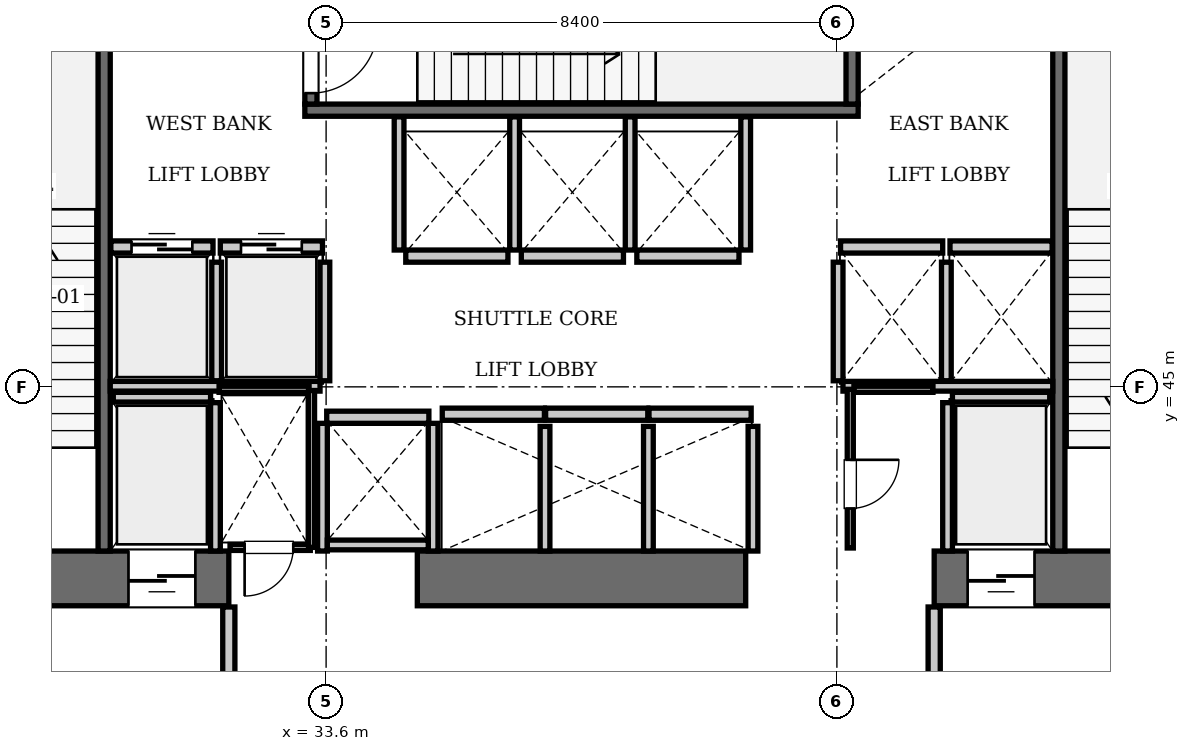
"""IFC4 building model, lengths in metres.
Left out: names, types, materials, properties, quantities, classifications, styles, units other than length and angle.
Written with IfcOpenShell. Run it as: python <this file> out.ifc"""

import sys

from ifc_helpers import new_model, si_unit, direction, frame, frame_2d, origin, place, context, subcontext, project, spatial, rectangle, extrude, element, fill, save


model = new_model("IFC4")
c1 = context("Model", 3, precision=1e-05, world=origin(), true_north=direction((0.0, 1.0)))
c2 = subcontext(c1, "Body", "Model", "MODEL_VIEW")
j1 = project(units=[si_unit("LENGTHUNIT", "METRE"), si_unit("PLANEANGLEUNIT", "RADIAN")], contexts=[c1])
p1 = place(None, origin())
s1 = spatial("IfcSite", under=j1, at=p1, CompositionType="ELEMENT")
p2 = place(p1, origin())
s2 = spatial("IfcBuilding", under=s1, at=p2, CompositionType="ELEMENT")
p3 = place(p2, frame((0.0, 0.0, 5.6)))
s3 = spatial("IfcBuildingStorey", under=s2, at=p3, CompositionType="ELEMENT", Elevation=5.6)
p4 = place(p3, frame((25.2, 41.85, 0.0), z_axis=(0.0, 0.0, 1.0), x_axis=(1.0, 0.0, 0.0)))
e1 = element("IfcWall", 1, at=p4, inside=s3, PredefinedType="SHEAR", context=c2, shape_type="SweptSolid", body=[
    extrude(rectangle(XDim=6.8, YDim=0.9, at=frame_2d((3.4, 0.0))), origin(), (0.0, 0.0, 1.0), 5.25),
])
p5 = place(p4, frame((1.65, 0.0, 0.0)))
e2 = element("IfcOpeningElement", 2, at=p5, cuts=e1, PredefinedType="OPENING", context=c2, shape_type="SweptSolid", body=[
    extrude(rectangle(XDim=1.15, YDim=2.15, at=frame_2d((0.575, 1.075))), frame((0.0, 0.46, 0.0), z_axis=(0.0, -1.0, 0.0), x_axis=(1.0, 0.0, 0.0)), (0.0, 0.0, 1.0), 0.92),
])
p6 = place(p4, frame((5.15, 0.0, 0.0)))
e3 = element("IfcOpeningElement", 3, at=p6, cuts=e1, PredefinedType="OPENING", context=c2, shape_type="SweptSolid", body=[
    extrude(rectangle(XDim=1.1, YDim=2.2, at=frame_2d((0.55, 1.1))), frame((0.0, 0.46, 0.0), z_axis=(0.0, -1.0, 0.0), x_axis=(1.0, 0.0, 0.0)), (0.0, 0.0, 1.0), 0.92),
])
p7 = place(p3, frame((35.1, 41.85, 0.0), z_axis=(0.0, 0.0, 1.0), x_axis=(1.0, 0.0, 0.0)))
e4 = element("IfcWall", 4, at=p7, inside=s3, PredefinedType="SHEAR", context=c2, shape_type="SweptSolid", body=[
    extrude(rectangle(XDim=5.4, YDim=0.9, at=frame_2d((2.7, 0.0))), origin(), (0.0, 0.0, 1.0), 5.25),
])
p8 = place(p3, frame((43.6, 41.85, 0.0), z_axis=(0.0, 0.0, 1.0), x_axis=(1.0, 0.0, 0.0)))
e5 = element("IfcWall", 5, at=p8, inside=s3, PredefinedType="SHEAR", context=c2, shape_type="SweptSolid", body=[
    extrude(rectangle(XDim=6.8, YDim=0.9, at=frame_2d((3.4, 0.0))), origin(), (0.0, 0.0, 1.0), 5.25),
])
p9 = place(p8, frame((3.9, 0.0, 0.0)))
e6 = element("IfcOpeningElement", 6, at=p9, cuts=e5, PredefinedType="OPENING", context=c2, shape_type="SweptSolid", body=[
    extrude(rectangle(XDim=1.15, YDim=2.15, at=frame_2d((0.575, 1.075))), frame((0.0, 0.46, 0.0), z_axis=(0.0, -1.0, 0.0), x_axis=(1.0, 0.0, 0.0)), (0.0, 0.0, 1.0), 0.92),
])
p10 = place(p8, frame((0.55, 0.0, 0.0)))
e7 = element("IfcOpeningElement", 7, at=p10, cuts=e5, PredefinedType="OPENING", context=c2, shape_type="SweptSolid", body=[
    extrude(rectangle(XDim=1.1, YDim=2.2, at=frame_2d((0.55, 1.1))), frame((0.0, 0.46, 0.0), z_axis=(0.0, -1.0, 0.0), x_axis=(1.0, 0.0, 0.0)), (0.0, 0.0, 1.0), 0.92),
])
p11 = place(p3, frame((29.95, 42.3, 0.0), z_axis=(0.0, 0.0, 1.0), x_axis=(0.0, 1.0, 0.0)))
e8 = element("IfcWall", 8, at=p11, inside=s3, PredefinedType="SOLIDWALL", context=c2, shape_type="SweptSolid", body=[
    extrude(rectangle(XDim=8.85, YDim=0.2, at=frame_2d((4.425, 0.0))), origin(), (0.0, 0.0, 1.0), 4.97),
])
p12 = place(p3, frame((33.25, 49.55, 0.0), z_axis=(0.0, 0.0, 1.0), x_axis=(1.0, 0.0, 0.0)))
e9 = element("IfcWall", 9, at=p12, inside=s3, PredefinedType="SOLIDWALL", context=c2, shape_type="SweptSolid", body=[
    extrude(rectangle(XDim=9.1, YDim=0.2, at=frame_2d((4.55, 0.0))), origin(), (0.0, 0.0, 1.0), 4.97),
])
p13 = place(p3, frame((42.25, 49.65, 0.0), z_axis=(0.0, 0.0, 1.0), x_axis=(0.0, 1.0, 0.0)))
e10 = element("IfcWall", 10, at=p13, inside=s3, PredefinedType="SOLIDWALL", context=c2, shape_type="SweptSolid", body=[
    extrude(rectangle(XDim=3.45, YDim=0.2, at=frame_2d((1.725, 0.0))), origin(), (0.0, 0.0, 1.0), 4.97),
])
p14 = place(p3, frame((33.35, 49.65, 0.0), z_axis=(0.0, 0.0, 1.0), x_axis=(0.0, 1.0, 0.0)))
e11 = element("IfcWall", 11, at=p14, inside=s3, PredefinedType="SOLIDWALL", context=c2, shape_type="SweptSolid", body=[
    extrude(rectangle(XDim=3.45, YDim=0.2, at=frame_2d((1.725, 0.0))), origin(), (0.0, 0.0, 1.0), 4.97),
])
p15 = place(p14, frame((0.18, 0.0, 0.0)))
e12 = element("IfcOpeningElement", 12, at=p15, cuts=e11, PredefinedType="OPENING", context=c2, shape_type="SweptSolid", body=[
    extrude(rectangle(XDim=1.1, YDim=2.15, at=frame_2d((0.55, 1.075))), frame((0.0, 0.11, 0.0), z_axis=(0.0, -1.0, 0.0), x_axis=(1.0, 0.0, 0.0)), (0.0, 0.0, 1.0), 0.22),
])
p16 = place(p3, frame((45.65, 42.3, 0.0), z_axis=(0.0, 0.0, 1.0), x_axis=(0.0, 1.0, 0.0)))
e13 = element("IfcWall", 13, at=p16, inside=s3, PredefinedType="SOLIDWALL", context=c2, shape_type="SweptSolid", body=[
    extrude(rectangle(XDim=8.85, YDim=0.2, at=frame_2d((4.425, 0.0))), origin(), (0.0, 0.0, 1.0), 4.97),
])
p17 = place(p3, frame((30.06, 47.3, 0.0), z_axis=(0.0, 0.0, 1.0), x_axis=(1.0, 0.0, 0.0)))
e14 = element("IfcWall", 14, at=p17, inside=s3, PredefinedType="SOLIDWALL", context=c2, shape_type="SweptSolid", body=[
    extrude(rectangle(XDim=1.68, YDim=0.2, at=frame_2d((0.84, 0.0))), origin(), (0.0, 0.0, 1.0), 4.97),
])
p18 = place(p17, frame((0.34, 0.0, 0.0)))
e15 = element("IfcOpeningElement", 15, at=p18, cuts=e14, PredefinedType="OPENING", context=c2, shape_type="SweptSolid", body=[
    extrude(rectangle(XDim=1.0, YDim=2.15, at=frame_2d((0.5, 1.075))), frame((0.0, 0.11, 0.0), z_axis=(0.0, -1.0, 0.0), x_axis=(1.0, 0.0, 0.0)), (0.0, 0.0, 1.0), 0.22),
])
p19 = place(p3, frame((31.86, 47.3, 0.0), z_axis=(0.0, 0.0, 1.0), x_axis=(1.0, 0.0, 0.0)))
e16 = element("IfcWall", 16, at=p19, inside=s3, PredefinedType="SOLIDWALL", context=c2, shape_type="SweptSolid", body=[
    extrude(rectangle(XDim=1.68, YDim=0.2, at=frame_2d((0.84, 0.0))), origin(), (0.0, 0.0, 1.0), 4.97),
])
p20 = place(p19, frame((0.34, 0.0, 0.0)))
e17 = element("IfcOpeningElement", 17, at=p20, cuts=e16, PredefinedType="OPENING", context=c2, shape_type="SweptSolid", body=[
    extrude(rectangle(XDim=1.0, YDim=2.15, at=frame_2d((0.5, 1.075))), frame((0.0, 0.11, 0.0), z_axis=(0.0, -1.0, 0.0), x_axis=(1.0, 0.0, 0.0)), (0.0, 0.0, 1.0), 0.22),
])
for number, where, z_axis, x_axis in (
    (18, (42.06, 47.3, 0.0), (0.0, 0.0, 1.0), (1.0, 0.0, 0.0)),
    (19, (43.86, 47.3, 0.0), (0.0, 0.0, 1.0), (1.0, 0.0, 0.0)),
    (20, (35.51, 44.55, 0.0), (0.0, 0.0, 1.0), (1.0, 0.0, 0.0)),
    (21, (37.21, 44.55, 0.0), (0.0, 0.0, 1.0), (1.0, 0.0, 0.0)),
):
    element("IfcWall", number, at=place(p3, frame(where, z_axis=z_axis, x_axis=x_axis)), inside=s3, PredefinedType="SOLIDWALL", context=c2, shape_type="SweptSolid", body=[
        extrude(rectangle(XDim=1.68, YDim=0.2, at=frame_2d((0.84, 0.0))), origin(), (0.0, 0.0, 1.0), 4.97),
    ])
for number, where, z_axis, x_axis in (
    (22, (38.91, 44.55, 0.0), (0.0, 0.0, 1.0), (1.0, 0.0, 0.0)),
    (23, (34.91, 47.15, 0.0), (0.0, 0.0, 1.0), (1.0, 0.0, 0.0)),
):
    element("IfcWall", number, at=place(p3, frame(where, z_axis=z_axis, x_axis=x_axis)), inside=s3, PredefinedType="SOLIDWALL", context=c2, shape_type="SweptSolid", body=[
        extrude(rectangle(XDim=1.68, YDim=0.2, at=frame_2d((0.84, 0.0))), origin(), (0.0, 0.0, 1.0), 4.97),
    ])
for number, where, z_axis, x_axis in (
    (24, (36.81, 47.15, 0.0), (0.0, 0.0, 1.0), (1.0, 0.0, 0.0)),
    (25, (38.71, 47.15, 0.0), (0.0, 0.0, 1.0), (1.0, 0.0, 0.0)),
    (26, (33.61, 44.5, 0.0), (0.0, 0.0, 1.0), (1.0, 0.0, 0.0)),
):
    element("IfcWall", number, at=place(p3, frame(where, z_axis=z_axis, x_axis=x_axis)), inside=s3, PredefinedType="SOLIDWALL", context=c2, shape_type="SweptSolid", body=[
        extrude(rectangle(XDim=1.68, YDim=0.2, at=frame_2d((0.84, 0.0))), origin(), (0.0, 0.0, 1.0), 4.97),
    ])
p21 = place(p3, frame((30.1, 44.83, 0.0), z_axis=(0.0, 0.0, 1.0), x_axis=(1.0, 0.0, 0.0)))
e27 = element("IfcWall", 27, at=p21, inside=s3, PredefinedType="SOLIDWALL", context=c2, shape_type="SweptSolid", body=[
    extrude(rectangle(XDim=1.6, YDim=0.16, at=frame_2d((0.8, 0.0))), origin(), (0.0, 0.0, 1.0), 4.97),
])
p22 = place(p3, frame((31.78, 42.3, 0.0), z_axis=(0.0, 0.0, 1.0), x_axis=(0.0, 1.0, 0.0)))
e28 = element("IfcWall", 28, at=p22, inside=s3, PredefinedType="SOLIDWALL", context=c2, shape_type="SweptSolid", body=[
    extrude(rectangle(XDim=2.44, YDim=0.16, at=frame_2d((1.22, 0.0))), origin(), (0.0, 0.0, 1.0), 4.97),
])
p23 = place(p3, frame((43.9, 44.83, 0.0), z_axis=(0.0, 0.0, 1.0), x_axis=(1.0, 0.0, 0.0)))
e29 = element("IfcWall", 29, at=p23, inside=s3, PredefinedType="SOLIDWALL", context=c2, shape_type="SweptSolid", body=[
    extrude(rectangle(XDim=1.6, YDim=0.16, at=frame_2d((0.8, 0.0))), origin(), (0.0, 0.0, 1.0), 4.97),
])
p24 = place(p3, frame((43.82, 42.3, 0.0), z_axis=(0.0, 0.0, 1.0), x_axis=(0.0, 1.0, 0.0)))
e30 = element("IfcWall", 30, at=p24, inside=s3, PredefinedType="SOLIDWALL", context=c2, shape_type="SweptSolid", body=[
    extrude(rectangle(XDim=2.44, YDim=0.16, at=frame_2d((1.22, 0.0))), origin(), (0.0, 0.0, 1.0), 4.97),
])
for number, where, z_axis, x_axis in (
    (31, (31.8, 45.1, 0.0), (0.0, 0.0, 1.0), (0.0, 1.0, 0.0)),
    (32, (33.58, 45.1, 0.0), (0.0, 0.0, 1.0), (0.0, 1.0, 0.0)),
):
    element("IfcWall", number, at=place(p3, frame(where, z_axis=z_axis, x_axis=x_axis)), inside=s3, PredefinedType="SOLIDWALL", context=c2, shape_type="SweptSolid", body=[
        extrude(rectangle(XDim=1.95, YDim=0.16, at=frame_2d((0.975, 0.0))), origin(), (0.0, 0.0, 1.0), 4.97),
    ])
p25 = place(p3, frame((30.05, 45.01, 0.0), z_axis=(0.0, 0.0, 1.0), x_axis=(1.0, 0.0, 0.0)))
e33 = element("IfcWall", 33, at=p25, inside=s3, PredefinedType="SOLIDWALL", context=c2, shape_type="SweptSolid", body=[
    extrude(rectangle(XDim=3.45, YDim=0.16, at=frame_2d((1.725, 0.0))), origin(), (0.0, 0.0, 1.0), 4.97),
])
for number, where, z_axis, x_axis in (
    (34, (42.02, 45.1, 0.0), (0.0, 0.0, 1.0), (0.0, 1.0, 0.0)),
    (35, (43.8, 45.1, 0.0), (0.0, 0.0, 1.0), (0.0, 1.0, 0.0)),
):
    element("IfcWall", number, at=place(p3, frame(where, z_axis=z_axis, x_axis=x_axis)), inside=s3, PredefinedType="SOLIDWALL", context=c2, shape_type="SweptSolid", body=[
        extrude(rectangle(XDim=1.95, YDim=0.16, at=frame_2d((0.975, 0.0))), origin(), (0.0, 0.0, 1.0), 4.97),
    ])
p26 = place(p3, frame((42.1, 45.01, 0.0), z_axis=(0.0, 0.0, 1.0), x_axis=(1.0, 0.0, 0.0)))
e36 = element("IfcWall", 36, at=p26, inside=s3, PredefinedType="SOLIDWALL", context=c2, shape_type="SweptSolid", body=[
    extrude(rectangle(XDim=3.45, YDim=0.16, at=frame_2d((1.725, 0.0))), origin(), (0.0, 0.0, 1.0), 4.97),
])
for number, where, z_axis, x_axis in (
    (37, (37.2, 42.3, 0.0), (0.0, 0.0, 1.0), (0.0, 1.0, 0.0)),
    (38, (38.9, 42.3, 0.0), (0.0, 0.0, 1.0), (0.0, 1.0, 0.0)),
    (39, (40.62, 42.3, 0.0), (0.0, 0.0, 1.0), (0.0, 1.0, 0.0)),
):
    element("IfcWall", number, at=place(p3, frame(where, z_axis=z_axis, x_axis=x_axis)), inside=s3, PredefinedType="SOLIDWALL", context=c2, shape_type="SweptSolid", body=[
        extrude(rectangle(XDim=2.05, YDim=0.16, at=frame_2d((1.025, 0.0))), origin(), (0.0, 0.0, 1.0), 4.97),
    ])
for number, where, z_axis, x_axis in (
    (40, (34.8, 47.25, 0.0), (0.0, 0.0, 1.0), (0.0, 1.0, 0.0)),
    (41, (36.7, 47.25, 0.0), (0.0, 0.0, 1.0), (0.0, 1.0, 0.0)),
    (42, (38.6, 47.25, 0.0), (0.0, 0.0, 1.0), (0.0, 1.0, 0.0)),
    (43, (40.5, 47.25, 0.0), (0.0, 0.0, 1.0), (0.0, 1.0, 0.0)),
):
    element("IfcWall", number, at=place(p3, frame(where, z_axis=z_axis, x_axis=x_axis)), inside=s3, PredefinedType="SOLIDWALL", context=c2, shape_type="SweptSolid", body=[
        extrude(rectangle(XDim=2.19, YDim=0.16, at=frame_2d((1.095, 0.0))), origin(), (0.0, 0.0, 1.0), 4.97),
    ])
for number, where, z_axis, x_axis in (
    (44, (33.54, 42.3, 0.0), (0.0, 0.0, 1.0), (0.0, 1.0, 0.0)),
    (45, (35.36, 42.3, 0.0), (0.0, 0.0, 1.0), (0.0, 1.0, 0.0)),
):
    element("IfcWall", number, at=place(p3, frame(where, z_axis=z_axis, x_axis=x_axis)), inside=s3, PredefinedType="SOLIDWALL", context=c2, shape_type="SweptSolid", body=[
        extrude(rectangle(XDim=2.1, YDim=0.16, at=frame_2d((1.05, 0.0))), origin(), (0.0, 0.0, 1.0), 4.97),
    ])
p27 = place(p3, frame((33.62, 42.4, 0.0), z_axis=(0.0, 0.0, 1.0), x_axis=(1.0, 0.0, 0.0)))
e46 = element("IfcWall", 46, at=p27, inside=s3, PredefinedType="SOLIDWALL", context=c2, shape_type="SweptSolid", body=[
    extrude(rectangle(XDim=1.66, YDim=0.16, at=frame_2d((0.83, 0.0))), origin(), (0.0, 0.0, 1.0), 4.97),
])
for number, where, z_axis, x_axis in (
    (47, (32.0, 38.31, 0.0), (0.0, 0.0, 1.0), (0.0, 1.0, 0.0)),
    (48, (43.6, 38.31, 0.0), (0.0, 0.0, 1.0), (0.0, 1.0, 0.0)),
):
    element("IfcWall", number, at=place(p3, frame(where, z_axis=z_axis, x_axis=x_axis)), inside=s3, PredefinedType="PARTITIONING", context=c2, shape_type="SweptSolid", body=[
        extrude(rectangle(XDim=3.07, YDim=0.2, at=frame_2d((1.535, 0.0))), origin(), (0.0, 0.0, 1.0), 4.97),
    ])
p28 = place(p3, frame((32.02, 42.36, 0.0), z_axis=(0.0, 0.0, 1.0), x_axis=(1.0, 0.0, 0.0)))
e49 = element("IfcWall", 49, at=p28, inside=s3, PredefinedType="PARTITIONING", context=c2, shape_type="SweptSolid", body=[
    extrude(rectangle(XDim=1.32, YDim=0.1, at=frame_2d((0.66, 0.0))), origin(), (0.0, 0.0, 1.0), 4.97),
])
p29 = place(p28, frame((0.24, 0.0, 0.0)))
e50 = element("IfcOpeningElement", 50, at=p29, cuts=e49, PredefinedType="OPENING", context=c2, shape_type="SweptSolid", body=[
    extrude(rectangle(XDim=0.8, YDim=2.05, at=frame_2d((0.4, 1.025))), frame((0.0, 0.06, 0.0), z_axis=(0.0, -1.0, 0.0), x_axis=(1.0, 0.0, 0.0)), (0.0, 0.0, 1.0), 0.12),
])
p30 = place(p3, frame((31.84, 44.96, 0.0), z_axis=(0.0, 0.0, 1.0), x_axis=(1.0, 0.0, 0.0)))
e51 = element("IfcWall", 51, at=p30, inside=s3, PredefinedType="PARTITIONING", context=c2, shape_type="SweptSolid", body=[
    extrude(rectangle(XDim=1.48, YDim=0.1, at=frame_2d((0.74, 0.0))), origin(), (0.0, 0.0, 1.0), 4.97),
])
p31 = place(p3, frame((33.36, 42.36, 0.0), z_axis=(0.0, 0.0, 1.0), x_axis=(0.0, 1.0, 0.0)))
e52 = element("IfcWall", 52, at=p31, inside=s3, PredefinedType="PARTITIONING", context=c2, shape_type="SweptSolid", body=[
    extrude(rectangle(XDim=2.58, YDim=0.1, at=frame_2d((1.29, 0.0))), origin(), (0.0, 0.0, 1.0), 4.97),
])
p32 = place(p3, frame((42.22, 42.35, 0.0), z_axis=(0.0, 0.0, 1.0), x_axis=(0.0, 1.0, 0.0)))
e53 = element("IfcWall", 53, at=p32, inside=s3, PredefinedType="PARTITIONING", context=c2, shape_type="SweptSolid", body=[
    extrude(rectangle(XDim=2.61, YDim=0.1, at=frame_2d((1.305, 0.0))), origin(), (0.0, 0.0, 1.0), 4.97),
])
p33 = place(p32, frame((0.65, 0.0, 0.0)))
e54 = element("IfcOpeningElement", 54, at=p33, cuts=e53, PredefinedType="OPENING", context=c2, shape_type="SweptSolid", body=[
    extrude(rectangle(XDim=0.8, YDim=2.05, at=frame_2d((0.4, 1.025))), frame((0.0, 0.06, 0.0), z_axis=(0.0, -1.0, 0.0), x_axis=(1.0, 0.0, 0.0)), (0.0, 0.0, 1.0), 0.12),
])
p34 = place(p3, frame((42.28, 44.96, 0.0), z_axis=(0.0, 0.0, 1.0), x_axis=(1.0, 0.0, 0.0)))
e55 = element("IfcWall", 55, at=p34, inside=s3, PredefinedType="PARTITIONING", context=c2, shape_type="SweptSolid", body=[
    extrude(rectangle(XDim=1.3, YDim=0.1, at=frame_2d((0.65, 0.0))), origin(), (0.0, 0.0, 1.0), 4.97),
])
p35 = place(p15, frame((1.1, 0.0, 0.0), z_axis=(0.0, 0.0, 1.0), x_axis=(-1.0, 0.0, 0.0)))
e56 = element("IfcDoor", 56, at=p35, inside=s3, OperationType="SINGLE_SWING_LEFT", PredefinedType="DOOR", context=c2, shape_type="SweptSolid", body=[
    extrude(rectangle(XDim=1.1, YDim=2.15, at=frame_2d((0.55, 1.075))), frame((0.0, 0.025, 0.0), z_axis=(0.0, -1.0, 0.0), x_axis=(1.0, 0.0, 0.0)), (0.0, 0.0, 1.0), 0.05),
])
fill(e12, e56)
p36 = place(p18, origin())
e57 = element("IfcDoor", 57, at=p36, inside=s3, OperationType="SLIDING_TO_LEFT", PredefinedType="DOOR", context=c2, shape_type="SweptSolid", body=[
    extrude(rectangle(XDim=1.0, YDim=2.15, at=frame_2d((0.5, 1.075))), frame((0.0, 0.025, 0.0), z_axis=(0.0, -1.0, 0.0), x_axis=(1.0, 0.0, 0.0)), (0.0, 0.0, 1.0), 0.05),
])
fill(e15, e57)
p37 = place(p20, origin())
e58 = element("IfcDoor", 58, at=p37, inside=s3, OperationType="SLIDING_TO_LEFT", PredefinedType="DOOR", context=c2, shape_type="SweptSolid", body=[
    extrude(rectangle(XDim=1.0, YDim=2.15, at=frame_2d((0.5, 1.075))), frame((0.0, 0.025, 0.0), z_axis=(0.0, -1.0, 0.0), x_axis=(1.0, 0.0, 0.0)), (0.0, 0.0, 1.0), 0.05),
])
fill(e17, e58)
p38 = place(p6, frame((1.1, 0.0, 0.0), z_axis=(0.0, 0.0, 1.0), x_axis=(-1.0, 0.0, 0.0)))
e59 = element("IfcDoor", 59, at=p38, inside=s3, OperationType="SLIDING_TO_LEFT", PredefinedType="DOOR", context=c2, shape_type="SweptSolid", body=[
    extrude(rectangle(XDim=1.1, YDim=2.2, at=frame_2d((0.55, 1.1))), frame((0.0, 0.025, 0.0), z_axis=(0.0, -1.0, 0.0), x_axis=(1.0, 0.0, 0.0)), (0.0, 0.0, 1.0), 0.05),
])
fill(e3, e59)
p39 = place(p10, frame((1.1, 0.0, 0.0), z_axis=(0.0, 0.0, 1.0), x_axis=(-1.0, 0.0, 0.0)))
e60 = element("IfcDoor", 60, at=p39, inside=s3, OperationType="SLIDING_TO_LEFT", PredefinedType="DOOR", context=c2, shape_type="SweptSolid", body=[
    extrude(rectangle(XDim=1.1, YDim=2.2, at=frame_2d((0.55, 1.1))), frame((0.0, 0.025, 0.0), z_axis=(0.0, -1.0, 0.0), x_axis=(1.0, 0.0, 0.0)), (0.0, 0.0, 1.0), 0.05),
])
fill(e7, e60)
p40 = place(p29, frame((0.8, 0.0, 0.0), z_axis=(0.0, 0.0, 1.0), x_axis=(-1.0, 0.0, 0.0)))
e61 = element("IfcDoor", 61, at=p40, inside=s3, OperationType="SINGLE_SWING_RIGHT", PredefinedType="DOOR", context=c2, shape_type="SweptSolid", body=[
    extrude(rectangle(XDim=0.8, YDim=2.05, at=frame_2d((0.4, 1.025))), frame((0.0, 0.025, 0.0), z_axis=(0.0, -1.0, 0.0), x_axis=(1.0, 0.0, 0.0)), (0.0, 0.0, 1.0), 0.05),
])
fill(e50, e61)
p41 = place(p33, frame((0.8, 0.0, 0.0), z_axis=(0.0, 0.0, 1.0), x_axis=(-1.0, 0.0, 0.0)))
e62 = element("IfcDoor", 62, at=p41, inside=s3, OperationType="SINGLE_SWING_LEFT", PredefinedType="DOOR", context=c2, shape_type="SweptSolid", body=[
    extrude(rectangle(XDim=0.8, YDim=2.05, at=frame_2d((0.4, 1.025))), frame((0.0, 0.025, 0.0), z_axis=(0.0, -1.0, 0.0), x_axis=(1.0, 0.0, 0.0)), (0.0, 0.0, 1.0), 0.05),
])
fill(e54, e62)
save(model, sys.argv[1])
